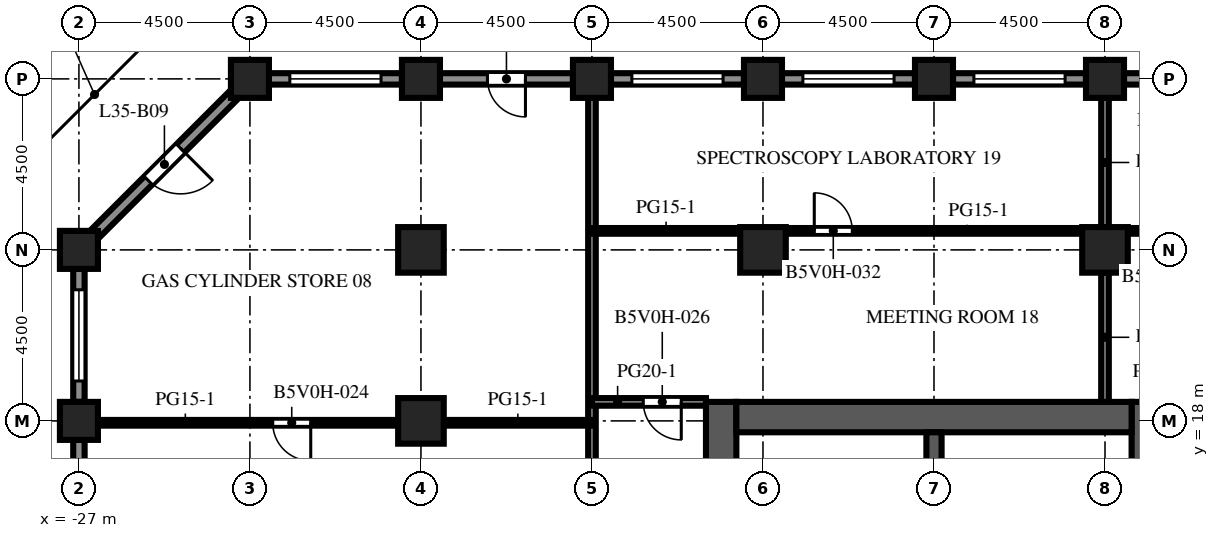
"""IFC4 building model, lengths in metres.
Left out: names, types, materials, properties, quantities, classifications, styles, units other than length and angle.
Written with IfcOpenShell. Run it as: python <this file> out.ifc"""

import sys

from ifc_helpers import new_model, si_unit, direction, frame, frame_2d, origin, origin_2d, place, context, subcontext, project, spatial, rectangle, extrude, element, fill, save


model = new_model("IFC4")
c1 = context("Model", 3, precision=1e-05, world=origin(), true_north=direction((0.0, 1.0)))
c2 = subcontext(c1, "Body", "Model", "MODEL_VIEW")
j1 = project(units=[si_unit("LENGTHUNIT", "METRE"), si_unit("PLANEANGLEUNIT", "RADIAN")], contexts=[c1])
p1 = place(None, origin())
s1 = spatial("IfcSite", under=j1, at=p1, CompositionType="ELEMENT")
p2 = place(p1, origin())
s2 = spatial("IfcBuilding", under=s1, at=p2, CompositionType="ELEMENT")
p3 = place(p2, frame((0.0, 0.0, 156.8)))
s3 = spatial("IfcBuildingStorey", under=s2, at=p3, CompositionType="ELEMENT", Elevation=156.8)
for number, where, z_axis, x_axis in (
    (1, (-27.0, 18.0, 0.0), (0.0, 0.0, 1.0), (1.0, 0.0, 0.0)),
    (2, (-27.0, 22.5, 0.0), (0.0, 0.0, 1.0), (1.0, 0.0, 0.0)),
    (3, (-22.5, 27.0, 0.0), (0.0, 0.0, 1.0), (1.0, 0.0, 0.0)),
    (4, (-18.0, 27.0, 0.0), (0.0, 0.0, 1.0), (1.0, 0.0, 0.0)),
    (5, (-13.5, 27.0, 0.0), (0.0, 0.0, 1.0), (1.0, 0.0, 0.0)),
    (6, (-9.0, 27.0, 0.0), (0.0, 0.0, 1.0), (1.0, 0.0, 0.0)),
    (7, (-4.5, 27.0, 0.0), (0.0, 0.0, 1.0), (1.0, 0.0, 0.0)),
    (8, (0.0, 27.0, 0.0), (0.0, 0.0, 1.0), (1.0, 0.0, 0.0)),
):
    element("IfcColumn", number, at=place(p3, frame(where, z_axis=z_axis, x_axis=x_axis)), inside=s3, PredefinedType="COLUMN", context=c2, shape_type="SweptSolid", body=[
        extrude(rectangle(XDim=1.0, YDim=1.0, at=origin_2d()), origin(), (0.0, 0.0, 1.0), 4.1),
    ])
for number, where, z_axis, x_axis in (
    (9, (-18.0, 18.0, 0.0), (0.0, 0.0, 1.0), (1.0, 0.0, 0.0)),
    (10, (-18.0, 22.5, 0.0), (0.0, 0.0, 1.0), (1.0, 0.0, 0.0)),
    (11, (-9.0, 22.5, 0.0), (0.0, 0.0, 1.0), (1.0, 0.0, 0.0)),
    (12, (0.0, 22.5, 0.0), (0.0, 0.0, 1.0), (1.0, 0.0, 0.0)),
):
    element("IfcColumn", number, at=place(p3, frame(where, z_axis=z_axis, x_axis=x_axis)), inside=s3, PredefinedType="COLUMN", context=c2, shape_type="SweptSolid", body=[
        extrude(rectangle(XDim=1.2, YDim=1.2, at=origin_2d()), origin(), (0.0, 0.0, 1.0), 4.1),
    ])
p4 = place(p3, frame((-10.1, -9.0, 0.0), z_axis=(0.0, 0.0, 1.0), x_axis=(0.0, 1.0, 0.0)))
e13 = element("IfcWall", 13, at=p4, inside=s3, PredefinedType="SHEAR", context=c2, shape_type="SweptSolid", body=[
    extrude(rectangle(XDim=27.5, YDim=0.8, at=frame_2d((13.75, 0.0))), origin(), (0.0, 0.0, 1.0), 4.1),
])
p5 = place(p4, frame((12.55, 0.0, 0.0)))
e14 = element("IfcOpeningElement", 14, at=p5, cuts=e13, PredefinedType="OPENING", context=c2, shape_type="SweptSolid", body=[
    extrude(rectangle(XDim=2.4, YDim=2.4, at=frame_2d((1.2, 1.2))), frame((0.0, 0.41, 0.0), z_axis=(0.0, -1.0, 0.0), x_axis=(1.0, 0.0, 0.0)), (0.0, 0.0, 1.0), 0.82),
])
p6 = place(p4, frame((6.825, 0.0, 0.0)))
e15 = element("IfcOpeningElement", 15, at=p6, cuts=e13, PredefinedType="OPENING", context=c2, shape_type="SweptSolid", body=[
    extrude(rectangle(XDim=1.2, YDim=2.1, at=frame_2d((0.6, 1.05))), frame((0.0, 0.41, 0.0), z_axis=(0.0, -1.0, 0.0), x_axis=(1.0, 0.0, 0.0)), (0.0, 0.0, 1.0), 0.82),
])
p7 = place(p4, frame((19.475, 0.0, 0.0)))
e16 = element("IfcOpeningElement", 16, at=p7, cuts=e13, PredefinedType="OPENING", context=c2, shape_type="SweptSolid", body=[
    extrude(rectangle(XDim=1.2, YDim=2.1, at=frame_2d((0.6, 1.05))), frame((0.0, 0.41, 0.0), z_axis=(0.0, -1.0, 0.0), x_axis=(1.0, 0.0, 0.0)), (0.0, 0.0, 1.0), 0.82),
])
p8 = place(p3, frame((1.1, -9.0, 0.0), z_axis=(0.0, 0.0, 1.0), x_axis=(0.0, 1.0, 0.0)))
e17 = element("IfcWall", 17, at=p8, inside=s3, PredefinedType="SHEAR", context=c2, shape_type="SweptSolid", body=[
    extrude(rectangle(XDim=27.5, YDim=0.8, at=frame_2d((13.75, 0.0))), origin(), (0.0, 0.0, 1.0), 4.1),
])
p9 = place(p8, frame((12.55, 0.0, 0.0)))
e18 = element("IfcOpeningElement", 18, at=p9, cuts=e17, PredefinedType="OPENING", context=c2, shape_type="SweptSolid", body=[
    extrude(rectangle(XDim=2.4, YDim=2.4, at=frame_2d((1.2, 1.2))), frame((0.0, 0.41, 0.0), z_axis=(0.0, -1.0, 0.0), x_axis=(1.0, 0.0, 0.0)), (0.0, 0.0, 1.0), 0.82),
])
p10 = place(p8, frame((5.45, 0.0, 0.0)))
e19 = element("IfcOpeningElement", 19, at=p10, cuts=e17, PredefinedType="OPENING", context=c2, shape_type="SweptSolid", body=[
    extrude(rectangle(XDim=1.2, YDim=2.1, at=frame_2d((0.6, 1.05))), frame((0.0, 0.41, 0.0), z_axis=(0.0, -1.0, 0.0), x_axis=(1.0, 0.0, 0.0)), (0.0, 0.0, 1.0), 0.82),
])
p11 = place(p8, frame((19.45, 0.0, 0.0)))
e20 = element("IfcOpeningElement", 20, at=p11, cuts=e17, PredefinedType="OPENING", context=c2, shape_type="SweptSolid", body=[
    extrude(rectangle(XDim=1.0, YDim=2.1, at=frame_2d((0.5, 1.05))), frame((0.0, 0.41, 0.0), z_axis=(0.0, -1.0, 0.0), x_axis=(1.0, 0.0, 0.0)), (0.0, 0.0, 1.0), 0.82),
])
p12 = place(p8, frame((21.137, 0.0, 0.0)))
e21 = element("IfcOpeningElement", 21, at=p12, cuts=e17, PredefinedType="OPENING", context=c2, shape_type="SweptSolid", body=[
    extrude(rectangle(XDim=1.0, YDim=2.1, at=frame_2d((0.5, 1.05))), frame((0.0, 0.41, 0.0), z_axis=(0.0, -1.0, 0.0), x_axis=(1.0, 0.0, 0.0)), (0.0, 0.0, 1.0), 0.82),
])
p13 = place(p8, frame((23.2, 0.0, 0.0)))
e22 = element("IfcOpeningElement", 22, at=p13, cuts=e17, PredefinedType="OPENING", context=c2, shape_type="SweptSolid", body=[
    extrude(rectangle(XDim=1.0, YDim=2.1, at=frame_2d((0.5, 1.05))), frame((0.0, 0.41, 0.0), z_axis=(0.0, -1.0, 0.0), x_axis=(1.0, 0.0, 0.0)), (0.0, 0.0, 1.0), 0.82),
])
p14 = place(p8, frame((25.262, 0.0, 0.0)))
e23 = element("IfcOpeningElement", 23, at=p14, cuts=e17, PredefinedType="OPENING", context=c2, shape_type="SweptSolid", body=[
    extrude(rectangle(XDim=1.0, YDim=2.1, at=frame_2d((0.5, 1.05))), frame((0.0, 0.41, 0.0), z_axis=(0.0, -1.0, 0.0), x_axis=(1.0, 0.0, 0.0)), (0.0, 0.0, 1.0), 0.82),
])
p15 = place(p3, frame((-9.7, 18.1, 0.0), z_axis=(0.0, 0.0, 1.0), x_axis=(1.0, 0.0, 0.0)))
e24 = element("IfcWall", 24, at=p15, inside=s3, PredefinedType="SHEAR", context=c2, shape_type="SweptSolid", body=[
    extrude(rectangle(XDim=10.4, YDim=0.8, at=frame_2d((5.2, 0.0))), origin(), (0.0, 0.0, 1.0), 4.1),
])
p16 = place(p3, frame((-4.5, 10.2, 0.0), z_axis=(0.0, 0.0, 1.0), x_axis=(0.0, 1.0, 0.0)))
e25 = element("IfcWall", 25, at=p16, inside=s3, PredefinedType="SHEAR", context=c2, shape_type="SweptSolid", body=[
    extrude(rectangle(XDim=7.5, YDim=0.4, at=frame_2d((3.75, 0.0))), origin(), (0.0, 0.0, 1.0), 4.1),
])
p17 = place(p3, frame((0.5, 27.0, 0.0), z_axis=(0.0, 0.0, 1.0), x_axis=(1.0, 0.0, 0.0)))
e26 = element("IfcWall", 26, at=p17, inside=s3, PredefinedType="SOLIDWALL", context=c2, shape_type="SweptSolid", body=[
    extrude(rectangle(XDim=3.5, YDim=0.3, at=frame_2d((1.75, 0.0))), origin(), (0.0, 0.0, 1.0), 2.85),
])
p18 = place(p17, frame((0.55, 0.0, 0.8)))
e27 = element("IfcOpeningElement", 27, at=p18, cuts=e26, PredefinedType="OPENING", context=c2, shape_type="SweptSolid", body=[
    extrude(rectangle(XDim=2.4, YDim=1.7, at=frame_2d((1.2, 0.85))), frame((0.0, 0.16, 0.0), z_axis=(0.0, -1.0, 0.0), x_axis=(1.0, 0.0, 0.0)), (0.0, 0.0, 1.0), 0.32),
])
p19 = place(p3, frame((-4.0, 27.0, 0.0), z_axis=(0.0, 0.0, 1.0), x_axis=(1.0, 0.0, 0.0)))
e28 = element("IfcWall", 28, at=p19, inside=s3, PredefinedType="SOLIDWALL", context=c2, shape_type="SweptSolid", body=[
    extrude(rectangle(XDim=3.5, YDim=0.3, at=frame_2d((1.75, 0.0))), origin(), (0.0, 0.0, 1.0), 2.85),
])
p20 = place(p19, frame((0.55, 0.0, 0.8)))
e29 = element("IfcOpeningElement", 29, at=p20, cuts=e28, PredefinedType="OPENING", context=c2, shape_type="SweptSolid", body=[
    extrude(rectangle(XDim=2.4, YDim=1.7, at=frame_2d((1.2, 0.85))), frame((0.0, 0.16, 0.0), z_axis=(0.0, -1.0, 0.0), x_axis=(1.0, 0.0, 0.0)), (0.0, 0.0, 1.0), 0.32),
])
p21 = place(p3, frame((-8.5, 27.0, 0.0), z_axis=(0.0, 0.0, 1.0), x_axis=(1.0, 0.0, 0.0)))
e30 = element("IfcWall", 30, at=p21, inside=s3, PredefinedType="SOLIDWALL", context=c2, shape_type="SweptSolid", body=[
    extrude(rectangle(XDim=3.5, YDim=0.3, at=frame_2d((1.75, 0.0))), origin(), (0.0, 0.0, 1.0), 2.85),
])
p22 = place(p21, frame((0.55, 0.0, 0.8)))
e31 = element("IfcOpeningElement", 31, at=p22, cuts=e30, PredefinedType="OPENING", context=c2, shape_type="SweptSolid", body=[
    extrude(rectangle(XDim=2.4, YDim=1.7, at=frame_2d((1.2, 0.85))), frame((0.0, 0.16, 0.0), z_axis=(0.0, -1.0, 0.0), x_axis=(1.0, 0.0, 0.0)), (0.0, 0.0, 1.0), 0.32),
])
p23 = place(p3, frame((-13.0, 27.0, 0.0), z_axis=(0.0, 0.0, 1.0), x_axis=(1.0, 0.0, 0.0)))
e32 = element("IfcWall", 32, at=p23, inside=s3, PredefinedType="SOLIDWALL", context=c2, shape_type="SweptSolid", body=[
    extrude(rectangle(XDim=3.5, YDim=0.3, at=frame_2d((1.75, 0.0))), origin(), (0.0, 0.0, 1.0), 2.85),
])
p24 = place(p23, frame((0.55, 0.0, 0.8)))
e33 = element("IfcOpeningElement", 33, at=p24, cuts=e32, PredefinedType="OPENING", context=c2, shape_type="SweptSolid", body=[
    extrude(rectangle(XDim=2.4, YDim=1.7, at=frame_2d((1.2, 0.85))), frame((0.0, 0.16, 0.0), z_axis=(0.0, -1.0, 0.0), x_axis=(1.0, 0.0, 0.0)), (0.0, 0.0, 1.0), 0.32),
])
p25 = place(p3, frame((-17.5, 27.0, 0.0), z_axis=(0.0, 0.0, 1.0), x_axis=(1.0, 0.0, 0.0)))
e34 = element("IfcWall", 34, at=p25, inside=s3, PredefinedType="SOLIDWALL", context=c2, shape_type="SweptSolid", body=[
    extrude(rectangle(XDim=3.5, YDim=0.3, at=frame_2d((1.75, 0.0))), origin(), (0.0, 0.0, 1.0), 2.85),
])
p26 = place(p25, frame((1.25, 0.0, 0.0)))
e35 = element("IfcOpeningElement", 35, at=p26, cuts=e34, PredefinedType="OPENING", context=c2, shape_type="SweptSolid", body=[
    extrude(rectangle(XDim=1.0, YDim=2.2, at=frame_2d((0.5, 1.1))), frame((0.0, 0.16, 0.0), z_axis=(0.0, -1.0, 0.0), x_axis=(1.0, 0.0, 0.0)), (0.0, 0.0, 1.0), 0.32),
])
p27 = place(p3, frame((-22.0, 27.0, 0.0), z_axis=(0.0, 0.0, 1.0), x_axis=(1.0, 0.0, 0.0)))
e36 = element("IfcWall", 36, at=p27, inside=s3, PredefinedType="SOLIDWALL", context=c2, shape_type="SweptSolid", body=[
    extrude(rectangle(XDim=3.5, YDim=0.3, at=frame_2d((1.75, 0.0))), origin(), (0.0, 0.0, 1.0), 2.85),
])
p28 = place(p27, frame((0.55, 0.0, 0.8)))
e37 = element("IfcOpeningElement", 37, at=p28, cuts=e36, PredefinedType="OPENING", context=c2, shape_type="SweptSolid", body=[
    extrude(rectangle(XDim=2.4, YDim=1.7, at=frame_2d((1.2, 0.85))), frame((0.0, 0.16, 0.0), z_axis=(0.0, -1.0, 0.0), x_axis=(1.0, 0.0, 0.0)), (0.0, 0.0, 1.0), 0.32),
])
p29 = place(p3, frame((-26.606, 22.894, 0.0), z_axis=(0.0, 0.0, 1.0), x_axis=(0.707106781187, 0.707106781187, 0.0)))
e38 = element("IfcWall", 38, at=p29, inside=s3, PredefinedType="SOLIDWALL", context=c2, shape_type="SweptSolid", body=[
    extrude(rectangle(XDim=5.25, YDim=0.3, at=frame_2d((2.625, 0.0))), origin(), (0.0, 0.0, 1.0), 2.85),
])
p30 = place(p29, frame((2.025, 0.0, 0.0)))
e39 = element("IfcOpeningElement", 39, at=p30, cuts=e38, PredefinedType="OPENING", context=c2, shape_type="SweptSolid", body=[
    extrude(rectangle(XDim=1.2, YDim=2.2, at=frame_2d((0.6, 1.1))), frame((0.0, 0.16, 0.0), z_axis=(0.0, -1.0, 0.0), x_axis=(1.0, 0.0, 0.0)), (0.0, 0.0, 1.0), 0.32),
])
p31 = place(p3, frame((-27.0, 18.5, 0.0), z_axis=(0.0, 0.0, 1.0), x_axis=(0.0, 1.0, 0.0)))
e40 = element("IfcWall", 40, at=p31, inside=s3, PredefinedType="SOLIDWALL", context=c2, shape_type="SweptSolid", body=[
    extrude(rectangle(XDim=3.5, YDim=0.3, at=frame_2d((1.75, 0.0))), origin(), (0.0, 0.0, 1.0), 2.85),
])
p32 = place(p31, frame((0.55, 0.0, 0.8)))
e41 = element("IfcOpeningElement", 41, at=p32, cuts=e40, PredefinedType="OPENING", context=c2, shape_type="SweptSolid", body=[
    extrude(rectangle(XDim=2.4, YDim=1.7, at=frame_2d((1.2, 0.85))), frame((0.0, 0.16, 0.0), z_axis=(0.0, -1.0, 0.0), x_axis=(1.0, 0.0, 0.0)), (0.0, 0.0, 1.0), 0.32),
])
p33 = place(p3, frame((-27.0, 14.0, 0.0), z_axis=(0.0, 0.0, 1.0), x_axis=(0.0, 1.0, 0.0)))
e42 = element("IfcWall", 42, at=p33, inside=s3, PredefinedType="SOLIDWALL", context=c2, shape_type="SweptSolid", body=[
    extrude(rectangle(XDim=3.5, YDim=0.3, at=frame_2d((1.75, 0.0))), origin(), (0.0, 0.0, 1.0), 2.85),
])
p34 = place(p33, frame((1.25, 0.0, 0.0)))
e43 = element("IfcOpeningElement", 43, at=p34, cuts=e42, PredefinedType="OPENING", context=c2, shape_type="SweptSolid", body=[
    extrude(rectangle(XDim=1.0, YDim=2.2, at=frame_2d((0.5, 1.1))), frame((0.0, 0.16, 0.0), z_axis=(0.0, -1.0, 0.0), x_axis=(1.0, 0.0, 0.0)), (0.0, 0.0, 1.0), 0.32),
])
p35 = place(p3, frame((-13.5, 6.25, 0.0), z_axis=(0.0, 0.0, 1.0), x_axis=(0.0, 1.0, 0.0)))
e44 = element("IfcWall", 44, at=p35, inside=s3, PredefinedType="PARTITIONING", context=c2, shape_type="SweptSolid", body=[
    extrude(rectangle(XDim=20.25, YDim=0.2, at=frame_2d((10.125, 0.0))), origin(), (0.0, 0.0, 1.0), 3.65),
])
for number, where, z_axis, x_axis in (
    (45, (0.0, 18.5, 0.0), (0.0, 0.0, 1.0), (0.0, 1.0, 0.0)),
    (46, (0.0, 23.1, 0.0), (0.0, 0.0, 1.0), (0.0, 1.0, 0.0)),
):
    element("IfcWall", number, at=place(p3, frame(where, z_axis=z_axis, x_axis=x_axis)), inside=s3, PredefinedType="PARTITIONING", context=c2, shape_type="SweptSolid", body=[
        extrude(rectangle(XDim=3.4, YDim=0.2, at=frame_2d((1.7, 0.0))), origin(), (0.0, 0.0, 1.0), 3.65),
    ])
p36 = place(p3, frame((-26.5, 17.95, 0.0), z_axis=(0.0, 0.0, 1.0), x_axis=(1.0, 0.0, 0.0)))
e47 = element("IfcWall", 47, at=p36, inside=s3, PredefinedType="PARTITIONING", context=c2, shape_type="SweptSolid", body=[
    extrude(rectangle(XDim=7.9, YDim=0.15, at=frame_2d((3.95, 0.0))), origin(), (0.0, 0.0, 1.0), 3.65),
])
p37 = place(p36, frame((4.6, 0.0, 0.0)))
e48 = element("IfcOpeningElement", 48, at=p37, cuts=e47, PredefinedType="OPENING", context=c2, shape_type="SweptSolid", body=[
    extrude(rectangle(XDim=1.0, YDim=2.1, at=frame_2d((0.5, 1.05))), frame((0.0, 0.085, 0.0), z_axis=(0.0, -1.0, 0.0), x_axis=(1.0, 0.0, 0.0)), (0.0, 0.0, 1.0), 0.17),
])
p38 = place(p3, frame((-17.4, 17.95, 0.0), z_axis=(0.0, 0.0, 1.0), x_axis=(1.0, 0.0, 0.0)))
e49 = element("IfcWall", 49, at=p38, inside=s3, PredefinedType="PARTITIONING", context=c2, shape_type="SweptSolid", body=[
    extrude(rectangle(XDim=3.9, YDim=0.15, at=frame_2d((1.95, 0.0))), origin(), (0.0, 0.0, 1.0), 3.65),
])
p39 = place(p3, frame((-13.5, 18.5, 0.0), z_axis=(0.0, 0.0, 1.0), x_axis=(1.0, 0.0, 0.0)))
e50 = element("IfcWall", 50, at=p39, inside=s3, PredefinedType="PARTITIONING", context=c2, shape_type="SweptSolid", body=[
    extrude(rectangle(XDim=3.0, YDim=0.2, at=frame_2d((1.5, 0.0))), origin(), (0.0, 0.0, 1.0), 3.65),
])
p40 = place(p39, frame((1.35, 0.0, 0.0)))
e51 = element("IfcOpeningElement", 51, at=p40, cuts=e50, PredefinedType="OPENING", context=c2, shape_type="SweptSolid", body=[
    extrude(rectangle(XDim=1.0, YDim=2.1, at=frame_2d((0.5, 1.05))), frame((0.0, 0.11, 0.0), z_axis=(0.0, -1.0, 0.0), x_axis=(1.0, 0.0, 0.0)), (0.0, 0.0, 1.0), 0.22),
])
p41 = place(p3, frame((-13.5, 23.0, 0.0), z_axis=(0.0, 0.0, 1.0), x_axis=(1.0, 0.0, 0.0)))
e52 = element("IfcWall", 52, at=p41, inside=s3, PredefinedType="PARTITIONING", context=c2, shape_type="SweptSolid", body=[
    extrude(rectangle(XDim=3.9, YDim=0.15, at=frame_2d((1.95, 0.0))), origin(), (0.0, 0.0, 1.0), 3.65),
])
p42 = place(p3, frame((-8.4, 23.0, 0.0), z_axis=(0.0, 0.0, 1.0), x_axis=(1.0, 0.0, 0.0)))
e53 = element("IfcWall", 53, at=p42, inside=s3, PredefinedType="PARTITIONING", context=c2, shape_type="SweptSolid", body=[
    extrude(rectangle(XDim=7.8, YDim=0.15, at=frame_2d((3.9, 0.0))), origin(), (0.0, 0.0, 1.0), 3.65),
])
p43 = place(p42, frame((0.75, 0.0, 0.0)))
e54 = element("IfcOpeningElement", 54, at=p43, cuts=e53, PredefinedType="OPENING", context=c2, shape_type="SweptSolid", body=[
    extrude(rectangle(XDim=1.0, YDim=2.1, at=frame_2d((0.5, 1.05))), frame((0.0, 0.085, 0.0), z_axis=(0.0, -1.0, 0.0), x_axis=(1.0, 0.0, 0.0)), (0.0, 0.0, 1.0), 0.17),
])
p44 = place(p3, frame((0.6, 23.0, 0.0), z_axis=(0.0, 0.0, 1.0), x_axis=(1.0, 0.0, 0.0)))
e55 = element("IfcWall", 55, at=p44, inside=s3, PredefinedType="PARTITIONING", context=c2, shape_type="SweptSolid", body=[
    extrude(rectangle(XDim=7.8, YDim=0.15, at=frame_2d((3.9, 0.0))), origin(), (0.0, 0.0, 1.0), 3.65),
])
p45 = place(p44, frame((1.0, 0.0, 0.0)))
e56 = element("IfcOpeningElement", 56, at=p45, cuts=e55, PredefinedType="OPENING", context=c2, shape_type="SweptSolid", body=[
    extrude(rectangle(XDim=1.0, YDim=2.1, at=frame_2d((0.5, 1.05))), frame((0.0, 0.085, 0.0), z_axis=(0.0, -1.0, 0.0), x_axis=(1.0, 0.0, 0.0)), (0.0, 0.0, 1.0), 0.17),
])
p46 = place(p20, origin())
e57 = element("IfcWindow", 57, at=p46, inside=s3, PartitioningType="SINGLE_PANEL", PredefinedType="WINDOW", context=c2, shape_type="SweptSolid", body=[
    extrude(rectangle(XDim=2.4, YDim=1.7, at=frame_2d((1.2, 0.85))), frame((0.0, 0.03, 0.0), z_axis=(0.0, -1.0, 0.0), x_axis=(1.0, 0.0, 0.0)), (0.0, 0.0, 1.0), 0.06),
])
fill(e29, e57)
p47 = place(p22, origin())
e58 = element("IfcWindow", 58, at=p47, inside=s3, PartitioningType="SINGLE_PANEL", PredefinedType="WINDOW", context=c2, shape_type="SweptSolid", body=[
    extrude(rectangle(XDim=2.4, YDim=1.7, at=frame_2d((1.2, 0.85))), frame((0.0, 0.03, 0.0), z_axis=(0.0, -1.0, 0.0), x_axis=(1.0, 0.0, 0.0)), (0.0, 0.0, 1.0), 0.06),
])
fill(e31, e58)
p48 = place(p24, origin())
e59 = element("IfcWindow", 59, at=p48, inside=s3, PartitioningType="SINGLE_PANEL", PredefinedType="WINDOW", context=c2, shape_type="SweptSolid", body=[
    extrude(rectangle(XDim=2.4, YDim=1.7, at=frame_2d((1.2, 0.85))), frame((0.0, 0.03, 0.0), z_axis=(0.0, -1.0, 0.0), x_axis=(1.0, 0.0, 0.0)), (0.0, 0.0, 1.0), 0.06),
])
fill(e33, e59)
p49 = place(p26, origin())
e60 = element("IfcDoor", 60, at=p49, inside=s3, OperationType="SINGLE_SWING_RIGHT", PredefinedType="DOOR", context=c2, shape_type="SweptSolid", body=[
    extrude(rectangle(XDim=1.0, YDim=2.2, at=frame_2d((0.5, 1.1))), frame((0.0, 0.025, 0.0), z_axis=(0.0, -1.0, 0.0), x_axis=(1.0, 0.0, 0.0)), (0.0, 0.0, 1.0), 0.05),
])
fill(e35, e60)
p50 = place(p28, origin())
e61 = element("IfcWindow", 61, at=p50, inside=s3, PartitioningType="SINGLE_PANEL", PredefinedType="WINDOW", context=c2, shape_type="SweptSolid", body=[
    extrude(rectangle(XDim=2.4, YDim=1.7, at=frame_2d((1.2, 0.85))), frame((0.0, 0.03, 0.0), z_axis=(0.0, -1.0, 0.0), x_axis=(1.0, 0.0, 0.0)), (0.0, 0.0, 1.0), 0.06),
])
fill(e37, e61)
p51 = place(p30, origin())
e62 = element("IfcDoor", 62, at=p51, inside=s3, OperationType="SINGLE_SWING_RIGHT", PredefinedType="DOOR", context=c2, shape_type="SweptSolid", body=[
    extrude(rectangle(XDim=1.2, YDim=2.2, at=frame_2d((0.6, 1.1))), frame((0.0, 0.025, 0.0), z_axis=(0.0, -1.0, 0.0), x_axis=(1.0, 0.0, 0.0)), (0.0, 0.0, 1.0), 0.05),
])
fill(e39, e62)
p52 = place(p32, origin())
e63 = element("IfcWindow", 63, at=p52, inside=s3, PartitioningType="SINGLE_PANEL", PredefinedType="WINDOW", context=c2, shape_type="SweptSolid", body=[
    extrude(rectangle(XDim=2.4, YDim=1.7, at=frame_2d((1.2, 0.85))), frame((0.0, 0.03, 0.0), z_axis=(0.0, -1.0, 0.0), x_axis=(1.0, 0.0, 0.0)), (0.0, 0.0, 1.0), 0.06),
])
fill(e41, e63)
p53 = place(p14, origin())
e64 = element("IfcDoor", 64, at=p53, inside=s3, OperationType="SINGLE_SWING_RIGHT", PredefinedType="DOOR", context=c2, shape_type="SweptSolid", body=[
    extrude(rectangle(XDim=1.0, YDim=2.1, at=frame_2d((0.5, 1.05))), frame((0.0, 0.375, 0.0), z_axis=(0.0, -1.0, 0.0), x_axis=(1.0, 0.0, 0.0)), (0.0, 0.0, 1.0), 0.05),
])
fill(e23, e64)
p54 = place(p37, origin())
e65 = element("IfcDoor", 65, at=p54, inside=s3, OperationType="SINGLE_SWING_RIGHT", PredefinedType="DOOR", context=c2, shape_type="SweptSolid", body=[
    extrude(rectangle(XDim=1.0, YDim=2.1, at=frame_2d((0.5, 1.05))), frame((0.0, 0.025, 0.0), z_axis=(0.0, -1.0, 0.0), x_axis=(1.0, 0.0, 0.0)), (0.0, 0.0, 1.0), 0.05),
])
fill(e48, e65)
p55 = place(p40, origin())
e66 = element("IfcDoor", 66, at=p55, inside=s3, OperationType="SINGLE_SWING_RIGHT", PredefinedType="DOOR", context=c2, shape_type="SweptSolid", body=[
    extrude(rectangle(XDim=1.0, YDim=2.1, at=frame_2d((0.5, 1.05))), frame((0.0, 0.025, 0.0), z_axis=(0.0, -1.0, 0.0), x_axis=(1.0, 0.0, 0.0)), (0.0, 0.0, 1.0), 0.05),
])
fill(e51, e66)
p56 = place(p43, origin())
e67 = element("IfcDoor", 67, at=p56, inside=s3, OperationType="SINGLE_SWING_LEFT", PredefinedType="DOOR", context=c2, shape_type="SweptSolid", body=[
    extrude(rectangle(XDim=1.0, YDim=2.1, at=frame_2d((0.5, 1.05))), frame((0.0, 0.025, 0.0), z_axis=(0.0, -1.0, 0.0), x_axis=(1.0, 0.0, 0.0)), (0.0, 0.0, 1.0), 0.05),
])
fill(e54, e67)
save(model, sys.argv[1])
